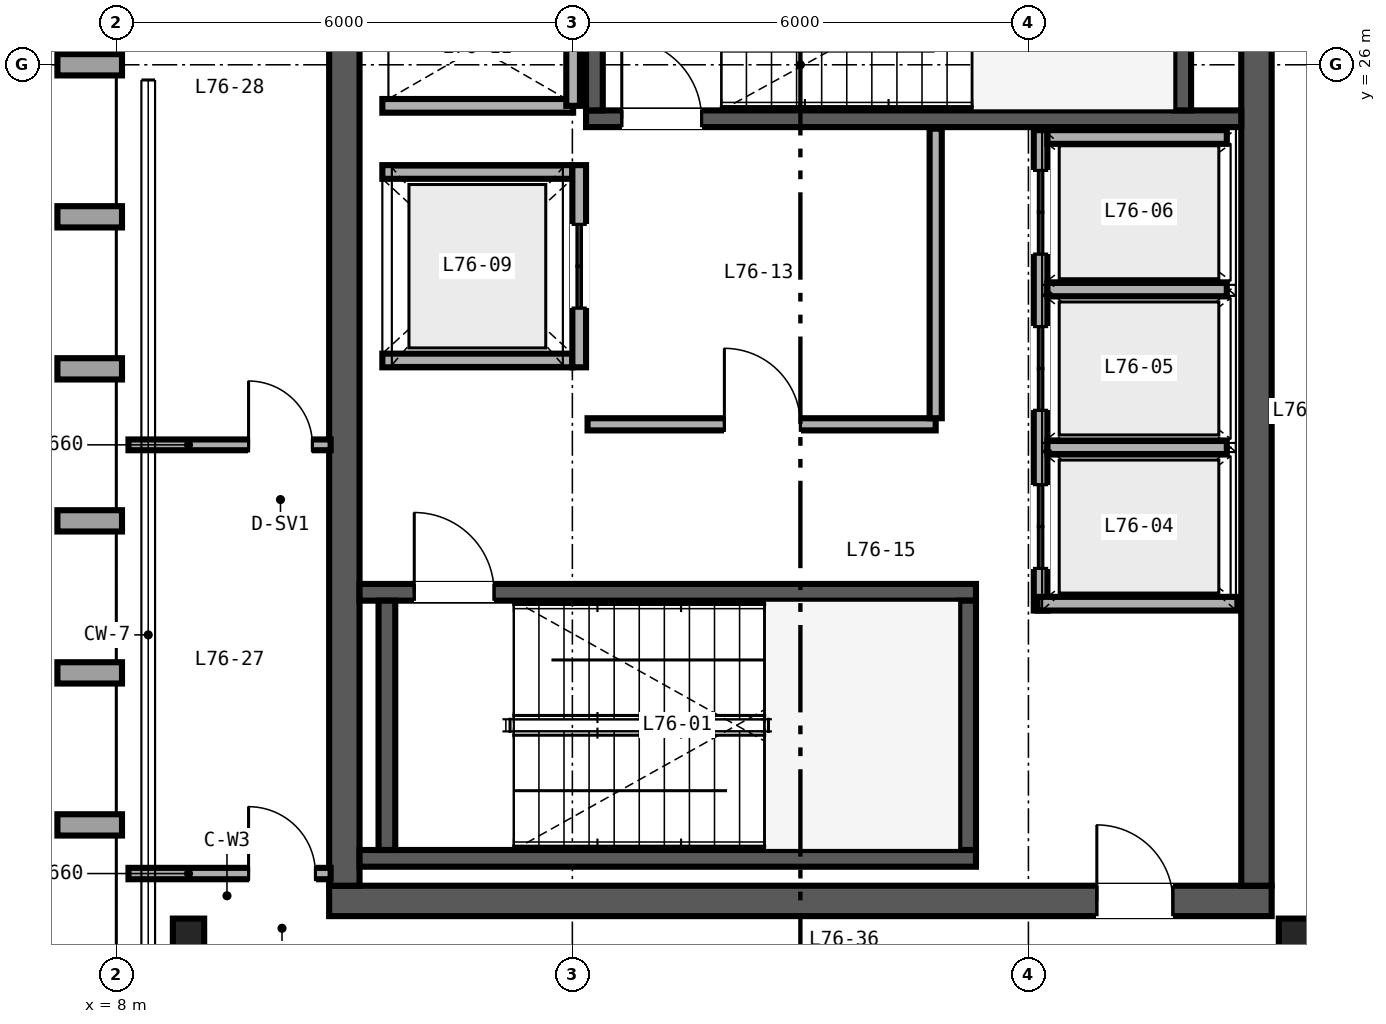
"""IFC4 building model, lengths in metres.
Left out: names, types, materials, properties, quantities, classifications, styles, units other than length and angle.
Written with IfcOpenShell. Run it as: python <this file> out.ifc"""

import sys

from ifc_helpers import new_model, si_unit, direction, frame, frame_2d, origin, origin_2d, place, context, subcontext, project, spatial, rectangle, i_section, extrude, source, transform, mapped, element, fill, save


model = new_model("IFC4")
c1 = context("Model", 3, precision=1e-05, world=origin(), true_north=direction((0.0, 1.0)))
c2 = subcontext(c1, "Body", "Model", "MODEL_VIEW")
j1 = project(units=[si_unit("LENGTHUNIT", "METRE"), si_unit("PLANEANGLEUNIT", "RADIAN")], contexts=[c1])
p1 = place(None, origin())
s1 = spatial("IfcSite", under=j1, at=p1, CompositionType="ELEMENT")
p2 = place(p1, origin())
s2 = spatial("IfcBuilding", under=s1, at=p2, CompositionType="ELEMENT")
p3 = place(p2, frame((0.0, 0.0, 297.6)))
s3 = spatial("IfcBuildingStorey", under=s2, at=p3, CompositionType="ELEMENT", Elevation=297.6)
p4 = place(p3, frame((10.8, 15.0, 0.0), z_axis=(0.0, 0.0, 1.0), x_axis=(1.0, 0.0, 0.0)))
e1 = element("IfcWall", 1, at=p4, inside=s3, PredefinedType="SHEAR", context=c2, shape_type="SweptSolid", body=[
    extrude(rectangle(XDim=12.4, YDim=0.4, at=frame_2d((6.2, 0.0))), origin(), (0.0, 0.0, 1.0), 3.32),
])
p5 = place(p4, frame((10.1, 0.0, 0.0)))
e2 = element("IfcOpeningElement", 2, at=p5, cuts=e1, PredefinedType="OPENING", context=c2, shape_type="SweptSolid", body=[
    extrude(rectangle(XDim=1.0, YDim=2.15, at=frame_2d((0.5, 1.075))), frame((0.0, 0.21, 0.0), z_axis=(0.0, -1.0, 0.0), x_axis=(1.0, 0.0, 0.0)), (0.0, 0.0, 1.0), 0.42),
])
for number, where, z_axis, x_axis in (
    (3, (11.0, 15.2, 0.0), (0.0, 0.0, 1.0), (0.0, 1.0, 0.0)),
    (4, (23.0, 15.2, 0.0), (0.0, 0.0, 1.0), (0.0, 1.0, 0.0)),
):
    element("IfcWall", number, at=place(p3, frame(where, z_axis=z_axis, x_axis=x_axis)), inside=s3, PredefinedType="SHEAR", context=c2, shape_type="SweptSolid", body=[
        extrude(rectangle(XDim=21.6, YDim=0.4, at=frame_2d((10.8, 0.0))), origin(), (0.0, 0.0, 1.0), 3.32),
    ])
p6 = place(p3, frame((11.2, 15.56, 0.0), z_axis=(0.0, 0.0, 1.0), x_axis=(1.0, 0.0, 0.0)))
e5 = element("IfcWall", 5, at=p6, inside=s3, PredefinedType="SHEAR", context=c2, shape_type="SweptSolid", body=[
    extrude(rectangle(XDim=8.11, YDim=0.22, at=frame_2d((4.055, 0.0))), origin(), (0.0, 0.0, 1.0), 3.4),
])
p7 = place(p3, frame((11.2, 19.06, 0.0), z_axis=(0.0, 0.0, 1.0), x_axis=(1.0, 0.0, 0.0)))
e6 = element("IfcWall", 6, at=p7, inside=s3, PredefinedType="SHEAR", context=c2, shape_type="SweptSolid", body=[
    extrude(rectangle(XDim=8.11, YDim=0.22, at=frame_2d((4.055, 0.0))), origin(), (0.0, 0.0, 1.0), 3.4),
])
p8 = place(p7, frame((0.72, 0.0, 0.0)))
e7 = element("IfcOpeningElement", 7, at=p8, cuts=e6, PredefinedType="OPENING", context=c2, shape_type="SweptSolid", body=[
    extrude(rectangle(XDim=1.05, YDim=2.15, at=frame_2d((0.525, 1.075))), frame((0.0, 0.12, 0.0), z_axis=(0.0, -1.0, 0.0), x_axis=(1.0, 0.0, 0.0)), (0.0, 0.0, 1.0), 0.24),
])
for number, where, z_axis, x_axis in (
    (8, (11.56, 15.67, 0.0), (0.0, 0.0, 1.0), (0.0, 1.0, 0.0)),
    (9, (19.2, 15.67, 0.0), (0.0, 0.0, 1.0), (0.0, 1.0, 0.0)),
):
    element("IfcWall", number, at=place(p3, frame(where, z_axis=z_axis, x_axis=x_axis)), inside=s3, PredefinedType="SHEAR", context=c2, shape_type="SweptSolid", body=[
        extrude(rectangle(XDim=3.28, YDim=0.22, at=frame_2d((1.64, 0.0))), origin(), (0.0, 0.0, 1.0), 3.4),
    ])
p9 = place(p3, frame((14.18, 25.29, 0.0), z_axis=(0.0, 0.0, 1.0), x_axis=(1.0, 0.0, 0.0)))
e10 = element("IfcWall", 10, at=p9, inside=s3, PredefinedType="SHEAR", context=c2, shape_type="SweptSolid", body=[
    extrude(rectangle(XDim=8.62, YDim=0.22, at=frame_2d((4.31, 0.0))), origin(), (0.0, 0.0, 1.0), 3.4),
])
p10 = place(p9, frame((0.47, 0.0, 0.0)))
e11 = element("IfcOpeningElement", 11, at=p10, cuts=e10, PredefinedType="OPENING", context=c2, shape_type="SweptSolid", body=[
    extrude(rectangle(XDim=1.05, YDim=2.15, at=frame_2d((0.525, 1.075))), frame((0.0, 0.12, 0.0), z_axis=(0.0, -1.0, 0.0), x_axis=(1.0, 0.0, 0.0)), (0.0, 0.0, 1.0), 0.24),
])
for number, where, z_axis, x_axis in (
    (12, (14.29, 25.4, 0.0), (0.0, 0.0, 1.0), (0.0, 1.0, 0.0)),
    (13, (22.03, 25.4, 0.0), (0.0, 0.0, 1.0), (0.0, 1.0, 0.0)),
):
    element("IfcWall", number, at=place(p3, frame(where, z_axis=z_axis, x_axis=x_axis)), inside=s3, PredefinedType="SHEAR", context=c2, shape_type="SweptSolid", body=[
        extrude(rectangle(XDim=3.28, YDim=0.22, at=frame_2d((1.64, 0.0))), origin(), (0.0, 0.0, 1.0), 3.4),
    ])
m1 = source(origin(), c2, "Body", "SweptSolid", [
    extrude(i_section(OverallWidth=0.412, OverallDepth=0.435, WebThickness=0.036, FlangeThickness=0.057, FilletRadius=0.025, at=origin_2d()), origin(), (0.0, 0.0, 1.0), 3.32),
])
for number, where, z_axis, x_axis in (
    (14, (8.95, 14.55, 0.0), (0.0, 0.0, 1.0), (1.0, 0.0, 0.0)),
    (15, (23.5, 14.55, 0.0), (0.0, 0.0, 1.0), (1.0, 0.0, 0.0)),
):
    element("IfcColumn", number, at=place(p3, frame(where, z_axis=z_axis, x_axis=x_axis)), inside=s3, PredefinedType="COLUMN", context=c2, shape_type="MappedRepresentation", body=[
        mapped(m1, transform((0.0, 0.0, 0.0), scale=1.0)),
    ])
p11 = place(p3, frame((20.16, 18.82, 0.0), z_axis=(0.0, 0.0, 1.0), x_axis=(0.0, 1.0, 0.0)))
e16 = element("IfcWall", 16, at=p11, inside=s3, PredefinedType="SOLIDWALL", context=c2, shape_type="SweptSolid", body=[
    extrude(rectangle(XDim=6.32, YDim=0.18, at=frame_2d((3.16, 0.0))), origin(), (0.0, 0.0, 1.0), 2.42),
])
p12 = place(p11, frame((0.555, 0.0, 0.0)))
e17 = element("IfcOpeningElement", 17, at=p12, cuts=e16, PredefinedType="OPENING", context=c2, shape_type="SweptSolid", body=[
    extrude(rectangle(XDim=1.1, YDim=2.2, at=frame_2d((0.55, 1.1))), frame((0.0, 0.1, 0.0), z_axis=(0.0, -1.0, 0.0), x_axis=(1.0, 0.0, 0.0)), (0.0, 0.0, 1.0), 0.2),
])
p13 = place(p11, frame((2.635, 0.0, 0.0)))
e18 = element("IfcOpeningElement", 18, at=p13, cuts=e16, PredefinedType="OPENING", context=c2, shape_type="SweptSolid", body=[
    extrude(rectangle(XDim=1.1, YDim=2.2, at=frame_2d((0.55, 1.1))), frame((0.0, 0.1, 0.0), z_axis=(0.0, -1.0, 0.0), x_axis=(1.0, 0.0, 0.0)), (0.0, 0.0, 1.0), 0.2),
])
p14 = place(p11, frame((4.69, 0.0, 0.0)))
e19 = element("IfcOpeningElement", 19, at=p14, cuts=e16, PredefinedType="OPENING", context=c2, shape_type="SweptSolid", body=[
    extrude(rectangle(XDim=1.1, YDim=2.2, at=frame_2d((0.55, 1.1))), frame((0.0, 0.1, 0.0), z_axis=(0.0, -1.0, 0.0), x_axis=(1.0, 0.0, 0.0)), (0.0, 0.0, 1.0), 0.2),
])
p15 = place(p3, frame((20.12, 18.91, 0.0), z_axis=(0.0, 0.0, 1.0), x_axis=(1.0, 0.0, 0.0)))
e20 = element("IfcWall", 20, at=p15, inside=s3, PredefinedType="SOLIDWALL", context=c2, shape_type="SweptSolid", body=[
    extrude(rectangle(XDim=2.63, YDim=0.18, at=frame_2d((1.315, 0.0))), origin(), (0.0, 0.0, 1.0), 3.32),
])
p16 = place(p3, frame((20.25, 25.05, 0.0), z_axis=(0.0, 0.0, 1.0), x_axis=(1.0, 0.0, 0.0)))
e21 = element("IfcWall", 21, at=p16, inside=s3, PredefinedType="SOLIDWALL", context=c2, shape_type="SweptSolid", body=[
    extrude(rectangle(XDim=2.36, YDim=0.18, at=frame_2d((1.18, 0.0))), origin(), (0.0, 0.0, 1.0), 3.32),
])
p17 = place(p3, frame((20.25, 20.965, 0.0), z_axis=(0.0, 0.0, 1.0), x_axis=(1.0, 0.0, 0.0)))
e22 = element("IfcWall", 22, at=p17, inside=s3, PredefinedType="SOLIDWALL", context=c2, shape_type="SweptSolid", body=[
    extrude(rectangle(XDim=2.36, YDim=0.18, at=frame_2d((1.18, 0.0))), origin(), (0.0, 0.0, 1.0), 2.42),
])
p18 = place(p3, frame((20.25, 23.045, 0.0), z_axis=(0.0, 0.0, 1.0), x_axis=(1.0, 0.0, 0.0)))
e23 = element("IfcWall", 23, at=p18, inside=s3, PredefinedType="SOLIDWALL", context=c2, shape_type="SweptSolid", body=[
    extrude(rectangle(XDim=2.36, YDim=0.18, at=frame_2d((1.18, 0.0))), origin(), (0.0, 0.0, 1.0), 3.32),
])
for number, where, z_axis, x_axis in (
    (24, (11.5, 22.11, 0.0), (0.0, 0.0, 1.0), (1.0, 0.0, 0.0)),
    (25, (11.5, 24.59, 0.0), (0.0, 0.0, 1.0), (1.0, 0.0, 0.0)),
):
    element("IfcWall", number, at=place(p3, frame(where, z_axis=z_axis, x_axis=x_axis)), inside=s3, PredefinedType="SOLIDWALL", context=c2, shape_type="SweptSolid", body=[
        extrude(rectangle(XDim=2.5, YDim=0.18, at=frame_2d((1.25, 0.0))), origin(), (0.0, 0.0, 1.0), 3.32),
    ])
p19 = place(p3, frame((14.09, 22.02, 0.0), z_axis=(0.0, 0.0, 1.0), x_axis=(0.0, 1.0, 0.0)))
e26 = element("IfcWall", 26, at=p19, inside=s3, PredefinedType="SOLIDWALL", context=c2, shape_type="SweptSolid", body=[
    extrude(rectangle(XDim=2.66, YDim=0.18, at=frame_2d((1.33, 0.0))), origin(), (0.0, 0.0, 1.0), 3.32),
])
p20 = place(p19, frame((0.78, 0.0, 0.0)))
e27 = element("IfcOpeningElement", 27, at=p20, cuts=e26, PredefinedType="OPENING", context=c2, shape_type="SweptSolid", body=[
    extrude(rectangle(XDim=1.1, YDim=2.2, at=frame_2d((0.55, 1.1))), frame((0.0, 0.1, 0.0), z_axis=(0.0, -1.0, 0.0), x_axis=(1.0, 0.0, 0.0)), (0.0, 0.0, 1.0), 0.2),
])
p21 = place(p3, frame((11.5, 25.46, 0.0), z_axis=(0.0, 0.0, 1.0), x_axis=(1.0, 0.0, 0.0)))
e28 = element("IfcWall", 28, at=p21, inside=s3, PredefinedType="SOLIDWALL", context=c2, shape_type="SweptSolid", body=[
    extrude(rectangle(XDim=2.51, YDim=0.18, at=frame_2d((1.255, 0.0))), origin(), (0.0, 0.0, 1.0), 3.32),
])
p22 = place(p3, frame((14.01, 25.46, 0.0), z_axis=(0.0, 0.0, 1.0), x_axis=(0.0, 1.0, 0.0)))
e29 = element("IfcWall", 29, at=p22, inside=s3, PredefinedType="SOLIDWALL", context=c2, shape_type="SweptSolid", body=[
    extrude(rectangle(XDim=3.08, YDim=0.18, at=frame_2d((1.54, 0.0))), origin(), (0.0, 0.0, 1.0), 3.32),
])
p23 = place(p3, frame((14.2, 21.27, 0.0), z_axis=(0.0, 0.0, 1.0), x_axis=(1.0, 0.0, 0.0)))
e30 = element("IfcWall", 30, at=p23, inside=s3, PredefinedType="PARTITIONING", context=c2, shape_type="SweptSolid", body=[
    extrude(rectangle(XDim=4.58, YDim=0.16, at=frame_2d((2.29, 0.0))), origin(), (0.0, 0.0, 1.0), 3.32),
])
p24 = place(p23, frame((1.8, 0.0, 0.0)))
e31 = element("IfcOpeningElement", 31, at=p24, cuts=e30, PredefinedType="OPENING", context=c2, shape_type="SweptSolid", body=[
    extrude(rectangle(XDim=1.0, YDim=2.15, at=frame_2d((0.5, 1.075))), frame((0.0, 0.09, 0.0), z_axis=(0.0, -1.0, 0.0), x_axis=(1.0, 0.0, 0.0)), (0.0, 0.0, 1.0), 0.18),
])
p25 = place(p3, frame((18.78, 21.35, 0.0), z_axis=(0.0, 0.0, 1.0), x_axis=(0.0, 1.0, 0.0)))
e32 = element("IfcWall", 32, at=p25, inside=s3, PredefinedType="PARTITIONING", context=c2, shape_type="SweptSolid", body=[
    extrude(rectangle(XDim=3.81, YDim=0.16, at=frame_2d((1.905, 0.0))), origin(), (0.0, 0.0, 1.0), 3.32),
])
p26 = place(p3, frame((8.16, 15.36, 0.0), z_axis=(0.0, 0.0, 1.0), x_axis=(1.0, 0.0, 0.0)))
e33 = element("IfcWall", 33, at=p26, inside=s3, PredefinedType="PARTITIONING", context=c2, shape_type="SweptSolid", body=[
    extrude(rectangle(XDim=2.66, YDim=0.15, at=frame_2d((1.33, 0.0))), origin(), (0.0, 0.0, 1.0), 2.541),
])
p27 = place(p26, frame((1.58, 0.0, 0.0)))
e34 = element("IfcOpeningElement", 34, at=p27, cuts=e33, PredefinedType="OPENING", context=c2, shape_type="SweptSolid", body=[
    extrude(rectangle(XDim=0.88, YDim=2.15, at=frame_2d((0.44, 1.075))), frame((0.0, 0.085, 0.0), z_axis=(0.0, -1.0, 0.0), x_axis=(1.0, 0.0, 0.0)), (0.0, 0.0, 1.0), 0.17),
])
p28 = place(p3, frame((8.16, 21.0, 0.0), z_axis=(0.0, 0.0, 1.0), x_axis=(1.0, 0.0, 0.0)))
e35 = element("IfcWall", 35, at=p28, inside=s3, PredefinedType="PARTITIONING", context=c2, shape_type="SweptSolid", body=[
    extrude(rectangle(XDim=2.66, YDim=0.142, at=frame_2d((1.33, 0.0))), origin(), (0.0, 0.0, 1.0), 2.42),
])
p29 = place(p28, frame((1.58, 0.0, 0.0)))
e36 = element("IfcOpeningElement", 36, at=p29, cuts=e35, PredefinedType="OPENING", context=c2, shape_type="SweptSolid", body=[
    extrude(rectangle(XDim=0.84, YDim=2.1, at=frame_2d((0.42, 1.05))), frame((0.0, 0.081, 0.0), z_axis=(0.0, -1.0, 0.0), x_axis=(1.0, 0.0, 0.0)), (0.0, 0.0, 1.0), 0.162),
])
m2 = source(origin(), c2, "Body", "SweptSolid", [
    extrude(rectangle(XDim=1.05, YDim=2.15, at=frame_2d((0.525, 1.075))), frame((0.0, 0.025, 0.0), z_axis=(0.0, -1.0, 0.0), x_axis=(1.0, 0.0, 0.0)), (0.0, 0.0, 1.0), 0.05),
])
p30 = place(p8, origin())
e37 = element("IfcDoor", 37, at=p30, inside=s3, OperationType="SINGLE_SWING_LEFT", PredefinedType="DOOR", context=c2, shape_type="MappedRepresentation", body=[
    mapped(m2, transform((0.0, 0.0, 0.0), scale=1.0)),
])
fill(e7, e37)
p31 = place(p10, origin())
e38 = element("IfcDoor", 38, at=p31, inside=s3, OperationType="SINGLE_SWING_LEFT", PredefinedType="DOOR", context=c2, shape_type="MappedRepresentation", body=[
    mapped(m2, transform((0.0, 0.0, 0.0), scale=1.0)),
])
fill(e11, e38)
m3 = source(origin(), c2, "Body", "SweptSolid", [
    extrude(rectangle(XDim=1.1, YDim=2.2, at=frame_2d((0.55, 1.1))), frame((0.0, 0.025, 0.0), z_axis=(0.0, -1.0, 0.0), x_axis=(1.0, 0.0, 0.0)), (0.0, 0.0, 1.0), 0.05),
])
p32 = place(p12, origin())
e39 = element("IfcDoor", 39, at=p32, inside=s3, OperationType="DOUBLE_DOOR_SLIDING", PredefinedType="DOOR", context=c2, shape_type="MappedRepresentation", body=[
    mapped(m3, transform((0.0, 0.0, 0.0), scale=1.0)),
])
fill(e17, e39)
p33 = place(p13, origin())
e40 = element("IfcDoor", 40, at=p33, inside=s3, OperationType="DOUBLE_DOOR_SLIDING", PredefinedType="DOOR", context=c2, shape_type="MappedRepresentation", body=[
    mapped(m3, transform((0.0, 0.0, 0.0), scale=1.0)),
])
fill(e18, e40)
p34 = place(p14, origin())
e41 = element("IfcDoor", 41, at=p34, inside=s3, OperationType="DOUBLE_DOOR_SLIDING", PredefinedType="DOOR", context=c2, shape_type="MappedRepresentation", body=[
    mapped(m3, transform((0.0, 0.0, 0.0), scale=1.0)),
])
fill(e19, e41)
p35 = place(p20, origin())
e42 = element("IfcDoor", 42, at=p35, inside=s3, OperationType="DOUBLE_DOOR_SLIDING", PredefinedType="DOOR", context=c2, shape_type="MappedRepresentation", body=[
    mapped(m3, transform((0.0, 0.0, 0.0), scale=1.0)),
])
fill(e27, e42)
m4 = source(origin(), c2, "Body", "SweptSolid", [
    extrude(rectangle(XDim=1.0, YDim=2.15, at=frame_2d((0.5, 1.075))), frame((0.0, 0.025, 0.0), z_axis=(0.0, -1.0, 0.0), x_axis=(1.0, 0.0, 0.0)), (0.0, 0.0, 1.0), 0.05),
])
p36 = place(p24, origin())
e43 = element("IfcDoor", 43, at=p36, inside=s3, OperationType="SINGLE_SWING_LEFT", PredefinedType="DOOR", context=c2, shape_type="MappedRepresentation", body=[
    mapped(m4, transform((0.0, 0.0, 0.0), scale=1.0)),
])
fill(e31, e43)
p37 = place(p5, origin())
e44 = element("IfcDoor", 44, at=p37, inside=s3, OperationType="SINGLE_SWING_LEFT", PredefinedType="DOOR", context=c2, shape_type="MappedRepresentation", body=[
    mapped(m4, transform((0.0, 0.0, 0.0), scale=1.0)),
])
fill(e2, e44)
m5 = source(origin(), c2, "Body", "SweptSolid", [
    extrude(rectangle(XDim=0.88, YDim=2.15, at=frame_2d((0.44, 1.075))), frame((0.0, 0.025, 0.0), z_axis=(0.0, -1.0, 0.0), x_axis=(1.0, 0.0, 0.0)), (0.0, 0.0, 1.0), 0.05),
])
p38 = place(p27, origin())
e45 = element("IfcDoor", 45, at=p38, inside=s3, OperationType="SINGLE_SWING_LEFT", PredefinedType="DOOR", context=c2, shape_type="MappedRepresentation", body=[
    mapped(m5, transform((0.0, 0.0, 0.0), scale=1.0)),
])
fill(e34, e45)
m6 = source(origin(), c2, "Body", "SweptSolid", [
    extrude(rectangle(XDim=0.84, YDim=2.1, at=frame_2d((0.42, 1.05))), frame((0.0, 0.025, 0.0), z_axis=(0.0, -1.0, 0.0), x_axis=(1.0, 0.0, 0.0)), (0.0, 0.0, 1.0), 0.05),
])
p39 = place(p29, origin())
e46 = element("IfcDoor", 46, at=p39, inside=s3, OperationType="SINGLE_SWING_LEFT", PredefinedType="DOOR", context=c2, shape_type="MappedRepresentation", body=[
    mapped(m6, transform((0.0, 0.0, 0.0), scale=1.0)),
])
fill(e36, e46)
save(model, sys.argv[1])
